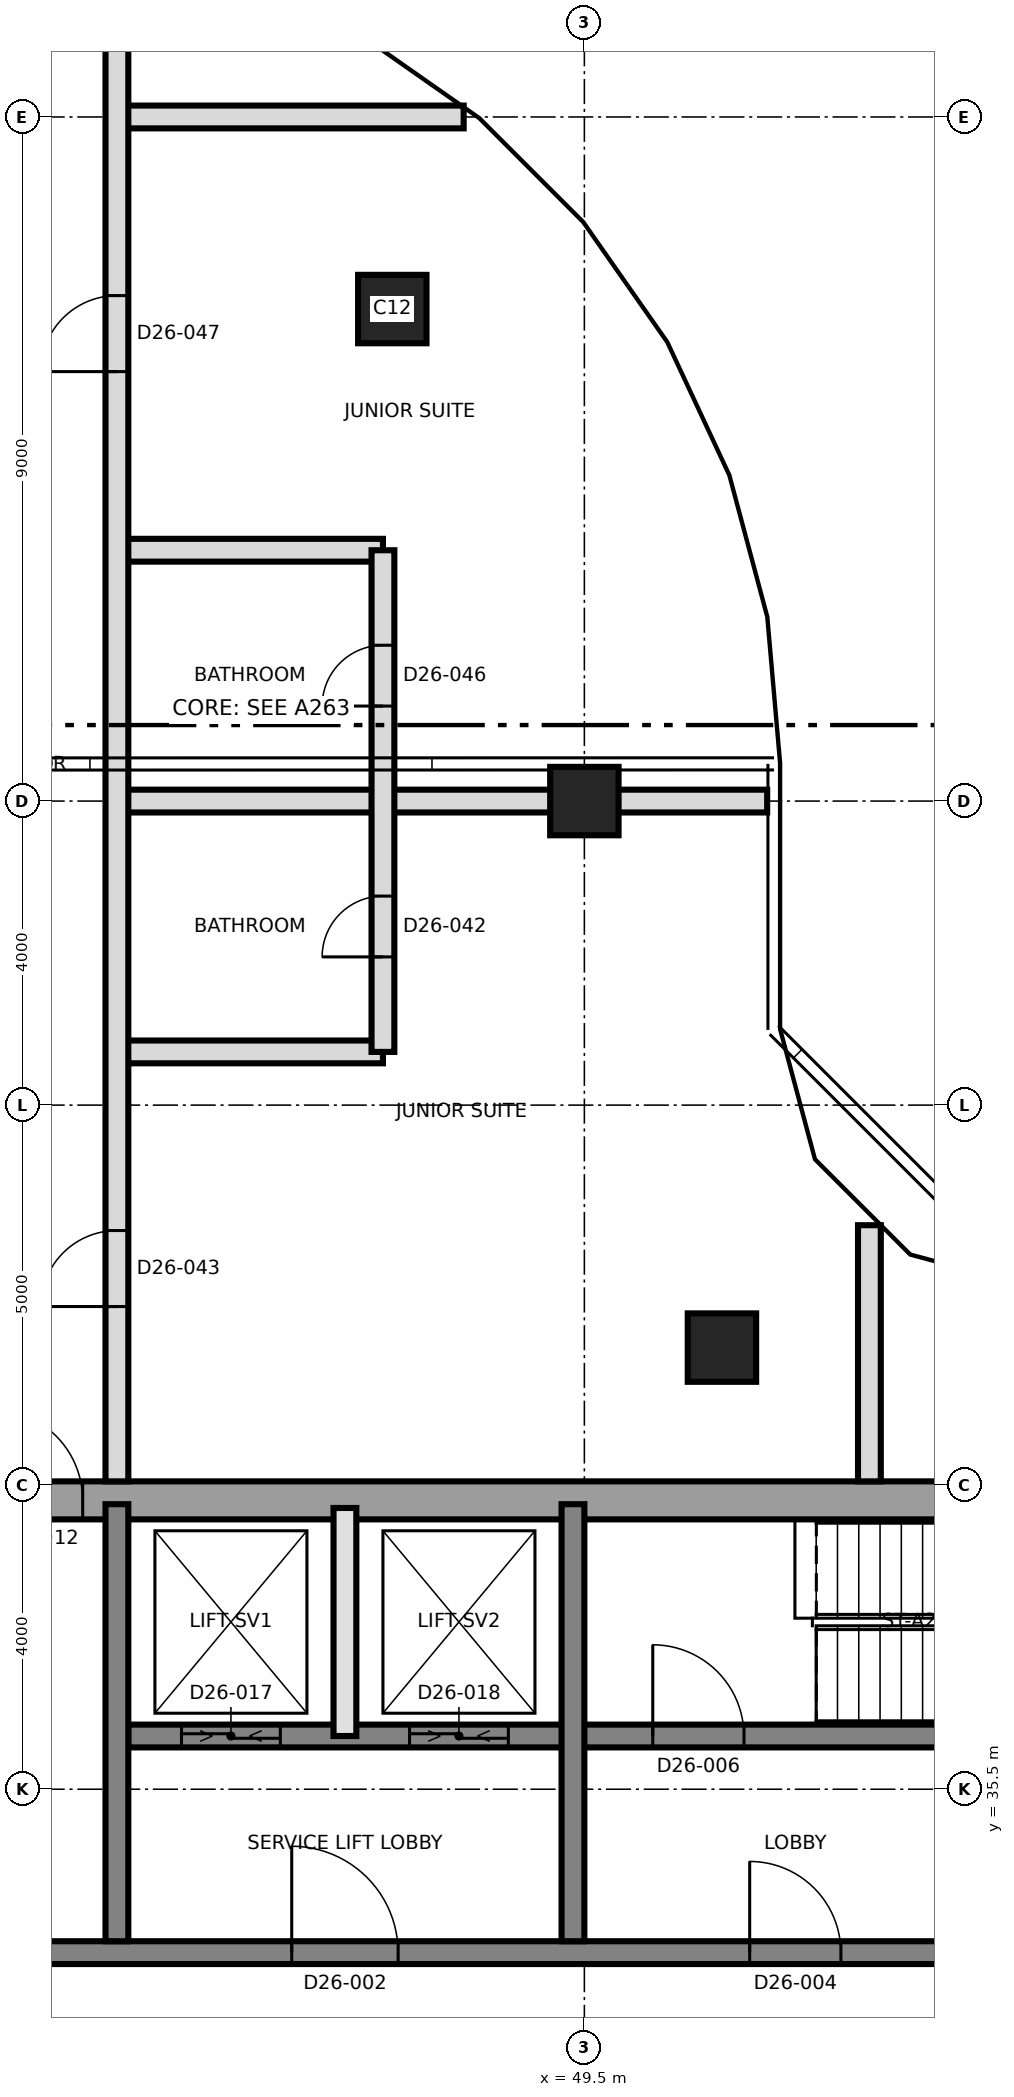
"""IFC4 building model, lengths in metres.
Left out: names, types, materials, properties, quantities, classifications, styles, units other than length and angle.
Written with IfcOpenShell. Run it as: python <this file> out.ifc"""

import sys

from ifc_helpers import new_model, si_unit, direction, frame, frame_2d, origin, origin_2d, place, context, subcontext, project, spatial, rectangle, extrude, element, fill, save


model = new_model("IFC4")
c1 = context("Model", 3, precision=1e-05, world=origin(), true_north=direction((0.0, 1.0)))
c2 = subcontext(c1, "Body", "Model", "MODEL_VIEW")
j1 = project(units=[si_unit("LENGTHUNIT", "METRE"), si_unit("PLANEANGLEUNIT", "RADIAN")], contexts=[c1])
p1 = place(None, origin())
s1 = spatial("IfcSite", under=j1, at=p1, CompositionType="ELEMENT")
p2 = place(p1, origin())
s2 = spatial("IfcBuilding", under=s1, at=p2, CompositionType="ELEMENT")
p3 = place(p2, frame((0.0, 0.0, 240.2)))
s3 = spatial("IfcBuildingStorey", under=s2, at=p3, CompositionType="ELEMENT", Elevation=240.2)
p4 = place(p3, frame((31.25, 39.3, 0.0), z_axis=(0.0, 0.0, 1.0), x_axis=(1.0, 0.0, 0.0)))
e1 = element("IfcWall", 1, at=p4, inside=s3, PredefinedType="SHEAR", context=c2, shape_type="SweptSolid", body=[
    extrude(rectangle(XDim=27.0, YDim=0.5, at=frame_2d((13.5, 0.0))), origin(), (0.0, 0.0, 1.0), 3.7),
])
p5 = place(p4, frame((10.45, 0.0, 0.0)))
e2 = element("IfcOpeningElement", 2, at=p5, cuts=e1, PredefinedType="OPENING", context=c2, shape_type="SweptSolid", body=[
    extrude(rectangle(XDim=1.2, YDim=2.1, at=frame_2d((0.6, 1.05))), frame((0.0, 0.26, 0.0), z_axis=(0.0, -1.0, 0.0), x_axis=(1.0, 0.0, 0.0)), (0.0, 0.0, 1.0), 0.52),
])
p6 = place(p3, frame((31.75, 33.35, 0.0), z_axis=(0.0, 0.0, 1.0), x_axis=(1.0, 0.0, 0.0)))
e3 = element("IfcWall", 3, at=p6, inside=s3, PredefinedType="SHEAR", context=c2, shape_type="SweptSolid", body=[
    extrude(rectangle(XDim=26.5, YDim=0.3, at=frame_2d((13.25, 0.0))), origin(), (0.0, 0.0, 1.0), 3.7),
])
p7 = place(p6, frame((13.9, 0.0, 0.0)))
e4 = element("IfcOpeningElement", 4, at=p7, cuts=e3, PredefinedType="OPENING", context=c2, shape_type="SweptSolid", body=[
    extrude(rectangle(XDim=1.4, YDim=2.1, at=frame_2d((0.7, 1.05))), frame((0.0, 0.16, 0.0), z_axis=(0.0, -1.0, 0.0), x_axis=(1.0, 0.0, 0.0)), (0.0, 0.0, 1.0), 0.32),
])
p8 = place(p6, frame((5.375, 0.0, 0.0)))
e5 = element("IfcOpeningElement", 5, at=p8, cuts=e3, PredefinedType="OPENING", context=c2, shape_type="SweptSolid", body=[
    extrude(rectangle(XDim=1.2, YDim=2.1, at=frame_2d((0.6, 1.05))), frame((0.0, 0.16, 0.0), z_axis=(0.0, -1.0, 0.0), x_axis=(1.0, 0.0, 0.0)), (0.0, 0.0, 1.0), 0.32),
])
p9 = place(p6, frame((19.925, 0.0, 0.0)))
e6 = element("IfcOpeningElement", 6, at=p9, cuts=e3, PredefinedType="OPENING", context=c2, shape_type="SweptSolid", body=[
    extrude(rectangle(XDim=1.2, YDim=2.1, at=frame_2d((0.6, 1.05))), frame((0.0, 0.16, 0.0), z_axis=(0.0, -1.0, 0.0), x_axis=(1.0, 0.0, 0.0)), (0.0, 0.0, 1.0), 0.32),
])
p10 = place(p3, frame((43.5, 36.2, 0.0), z_axis=(0.0, 0.0, 1.0), x_axis=(1.0, 0.0, 0.0)))
e7 = element("IfcWall", 7, at=p10, inside=s3, PredefinedType="SHEAR", context=c2, shape_type="SweptSolid", body=[
    extrude(rectangle(XDim=14.75, YDim=0.3, at=frame_2d((7.375, 0.0))), origin(), (0.0, 0.0, 1.0), 3.7),
])
p11 = place(p10, frame((6.9, 0.0, 0.0)))
e8 = element("IfcOpeningElement", 8, at=p11, cuts=e7, PredefinedType="OPENING", context=c2, shape_type="SweptSolid", body=[
    extrude(rectangle(XDim=1.2, YDim=2.1, at=frame_2d((0.6, 1.05))), frame((0.0, 0.16, 0.0), z_axis=(0.0, -1.0, 0.0), x_axis=(1.0, 0.0, 0.0)), (0.0, 0.0, 1.0), 0.32),
])
p12 = place(p10, frame((0.7, 0.0, 0.0)))
e9 = element("IfcOpeningElement", 9, at=p12, cuts=e7, PredefinedType="OPENING", context=c2, shape_type="SweptSolid", body=[
    extrude(rectangle(XDim=1.3, YDim=2.4, at=frame_2d((0.65, 1.2))), frame((0.0, 0.16, 0.0), z_axis=(0.0, -1.0, 0.0), x_axis=(1.0, 0.0, 0.0)), (0.0, 0.0, 1.0), 0.32),
])
p13 = place(p10, frame((3.7, 0.0, 0.0)))
e10 = element("IfcOpeningElement", 10, at=p13, cuts=e7, PredefinedType="OPENING", context=c2, shape_type="SweptSolid", body=[
    extrude(rectangle(XDim=1.3, YDim=2.4, at=frame_2d((0.65, 1.2))), frame((0.0, 0.16, 0.0), z_axis=(0.0, -1.0, 0.0), x_axis=(1.0, 0.0, 0.0)), (0.0, 0.0, 1.0), 0.32),
])
for number, where, z_axis, x_axis in (
    (11, (43.35, 33.5, 0.0), (0.0, 0.0, 1.0), (0.0, 1.0, 0.0)),
    (12, (49.35, 33.5, 0.0), (0.0, 0.0, 1.0), (0.0, 1.0, 0.0)),
):
    element("IfcWall", number, at=place(p3, frame(where, z_axis=z_axis, x_axis=x_axis)), inside=s3, PredefinedType="SHEAR", context=c2, shape_type="SweptSolid", body=[
        extrude(rectangle(XDim=5.75, YDim=0.3, at=frame_2d((2.875, 0.0))), origin(), (0.0, 0.0, 1.0), 3.7),
    ])
for number, where, z_axis, x_axis in (
    (13, (51.31, 41.31, 0.0), (0.0, 0.0, 1.0), (1.0, 0.0, 0.0)),
    (14, (49.5, 48.5, 0.0), (0.0, 0.0, 1.0), (1.0, 0.0, 0.0)),
    (15, (46.973, 54.973, 0.0), (0.0, 0.0, 1.0), (1.0, 0.0, 0.0)),
):
    element("IfcColumn", number, at=place(p3, frame(where, z_axis=z_axis, x_axis=x_axis)), inside=s3, PredefinedType="COLUMN", context=c2, shape_type="SweptSolid", body=[
        extrude(rectangle(XDim=0.9, YDim=0.9, at=origin_2d()), origin(), (0.0, 0.0, 1.0), 3.7),
    ])
p14 = place(p3, frame((46.35, 36.2, 0.0), z_axis=(0.0, 0.0, 1.0), x_axis=(0.0, 1.0, 0.0)))
e16 = element("IfcWall", 16, at=p14, inside=s3, PredefinedType="SOLIDWALL", context=c2, shape_type="SweptSolid", body=[
    extrude(rectangle(XDim=3.0, YDim=0.3, at=frame_2d((1.5, 0.0))), origin(), (0.0, 0.0, 1.0), 3.4),
])
p15 = place(p3, frame((43.35, 45.2, 0.0), z_axis=(0.0, 0.0, 1.0), x_axis=(1.0, 0.0, 0.0)))
e17 = element("IfcWall", 17, at=p15, inside=s3, PredefinedType="PARTITIONING", context=c2, shape_type="SweptSolid", body=[
    extrude(rectangle(XDim=3.5, YDim=0.3, at=frame_2d((1.75, 0.0))), origin(), (0.0, 0.0, 1.0), 3.4),
])
p16 = place(p3, frame((43.35, 48.5, 0.0), z_axis=(0.0, 0.0, 1.0), x_axis=(1.0, 0.0, 0.0)))
e18 = element("IfcWall", 18, at=p16, inside=s3, PredefinedType="PARTITIONING", context=c2, shape_type="SweptSolid", body=[
    extrude(rectangle(XDim=8.555, YDim=0.3, at=frame_2d((4.277, 0.0))), origin(), (0.0, 0.0, 1.0), 3.35),
])
p17 = place(p3, frame((43.35, 51.8, 0.0), z_axis=(0.0, 0.0, 1.0), x_axis=(1.0, 0.0, 0.0)))
e19 = element("IfcWall", 19, at=p17, inside=s3, PredefinedType="PARTITIONING", context=c2, shape_type="SweptSolid", body=[
    extrude(rectangle(XDim=3.5, YDim=0.3, at=frame_2d((1.75, 0.0))), origin(), (0.0, 0.0, 1.0), 3.4),
])
p18 = place(p3, frame((43.35, 57.5, 0.0), z_axis=(0.0, 0.0, 1.0), x_axis=(1.0, 0.0, 0.0)))
e20 = element("IfcWall", 20, at=p18, inside=s3, PredefinedType="PARTITIONING", context=c2, shape_type="SweptSolid", body=[
    extrude(rectangle(XDim=4.562, YDim=0.3, at=frame_2d((2.281, 0.0))), origin(), (0.0, 0.0, 1.0), 3.35),
])
p19 = place(p3, frame((43.35, 39.55, 0.0), z_axis=(0.0, 0.0, 1.0), x_axis=(0.0, 1.0, 0.0)))
e21 = element("IfcWall", 21, at=p19, inside=s3, PredefinedType="PARTITIONING", context=c2, shape_type="SweptSolid", body=[
    extrude(rectangle(XDim=19.0, YDim=0.3, at=frame_2d((9.5, 0.0))), origin(), (0.0, 0.0, 1.0), 3.35),
])
p20 = place(p19, frame((2.3, 0.0, 0.0)))
e22 = element("IfcOpeningElement", 22, at=p20, cuts=e21, PredefinedType="OPENING", context=c2, shape_type="SweptSolid", body=[
    extrude(rectangle(XDim=1.0, YDim=2.4, at=frame_2d((0.5, 1.2))), frame((0.0, 0.16, 0.0), z_axis=(0.0, -1.0, 0.0), x_axis=(1.0, 0.0, 0.0)), (0.0, 0.0, 1.0), 0.32),
])
p21 = place(p19, frame((14.6, 0.0, 0.0)))
e23 = element("IfcOpeningElement", 23, at=p21, cuts=e21, PredefinedType="OPENING", context=c2, shape_type="SweptSolid", body=[
    extrude(rectangle(XDim=1.0, YDim=2.4, at=frame_2d((0.5, 1.2))), frame((0.0, 0.16, 0.0), z_axis=(0.0, -1.0, 0.0), x_axis=(1.0, 0.0, 0.0)), (0.0, 0.0, 1.0), 0.32),
])
p22 = place(p3, frame((46.85, 45.2, 0.0), z_axis=(0.0, 0.0, 1.0), x_axis=(0.0, 1.0, 0.0)))
e24 = element("IfcWall", 24, at=p22, inside=s3, PredefinedType="PARTITIONING", context=c2, shape_type="SweptSolid", body=[
    extrude(rectangle(XDim=6.6, YDim=0.3, at=frame_2d((3.3, 0.0))), origin(), (0.0, 0.0, 1.0), 3.4),
])
p23 = place(p22, frame((1.25, 0.0, 0.0)))
e25 = element("IfcOpeningElement", 25, at=p23, cuts=e24, PredefinedType="OPENING", context=c2, shape_type="SweptSolid", body=[
    extrude(rectangle(XDim=0.8, YDim=2.1, at=frame_2d((0.4, 1.05))), frame((0.0, 0.16, 0.0), z_axis=(0.0, -1.0, 0.0), x_axis=(1.0, 0.0, 0.0)), (0.0, 0.0, 1.0), 0.32),
])
p24 = place(p22, frame((4.55, 0.0, 0.0)))
e26 = element("IfcOpeningElement", 26, at=p24, cuts=e24, PredefinedType="OPENING", context=c2, shape_type="SweptSolid", body=[
    extrude(rectangle(XDim=0.8, YDim=2.1, at=frame_2d((0.4, 1.05))), frame((0.0, 0.16, 0.0), z_axis=(0.0, -1.0, 0.0), x_axis=(1.0, 0.0, 0.0)), (0.0, 0.0, 1.0), 0.32),
])
p25 = place(p3, frame((53.25, 39.55, 0.0), z_axis=(0.0, 0.0, 1.0), x_axis=(0.0, 1.0, 0.0)))
e27 = element("IfcWall", 27, at=p25, inside=s3, PredefinedType="PARTITIONING", context=c2, shape_type="SweptSolid", body=[
    extrude(rectangle(XDim=3.37, YDim=0.3, at=frame_2d((1.685, 0.0))), origin(), (0.0, 0.0, 1.0), 3.35),
])
p26 = place(p7, origin())
e28 = element("IfcDoor", 28, at=p26, inside=s3, OperationType="SINGLE_SWING_RIGHT", PredefinedType="DOOR", context=c2, shape_type="SweptSolid", body=[
    extrude(rectangle(XDim=1.4, YDim=2.1, at=frame_2d((0.7, 1.05))), frame((0.0, 0.025, 0.0), z_axis=(0.0, -1.0, 0.0), x_axis=(1.0, 0.0, 0.0)), (0.0, 0.0, 1.0), 0.05),
])
fill(e4, e28)
p27 = place(p9, origin())
e29 = element("IfcDoor", 29, at=p27, inside=s3, OperationType="SINGLE_SWING_RIGHT", PredefinedType="DOOR", context=c2, shape_type="SweptSolid", body=[
    extrude(rectangle(XDim=1.2, YDim=2.1, at=frame_2d((0.6, 1.05))), frame((0.0, 0.025, 0.0), z_axis=(0.0, -1.0, 0.0), x_axis=(1.0, 0.0, 0.0)), (0.0, 0.0, 1.0), 0.05),
])
fill(e6, e29)
p28 = place(p11, origin())
e30 = element("IfcDoor", 30, at=p28, inside=s3, OperationType="SINGLE_SWING_LEFT", PredefinedType="DOOR", context=c2, shape_type="SweptSolid", body=[
    extrude(rectangle(XDim=1.2, YDim=2.1, at=frame_2d((0.6, 1.05))), frame((0.0, 0.025, 0.0), z_axis=(0.0, -1.0, 0.0), x_axis=(1.0, 0.0, 0.0)), (0.0, 0.0, 1.0), 0.05),
])
fill(e8, e30)
p29 = place(p5, origin())
e31 = element("IfcDoor", 31, at=p29, inside=s3, OperationType="SINGLE_SWING_RIGHT", PredefinedType="DOOR", context=c2, shape_type="SweptSolid", body=[
    extrude(rectangle(XDim=1.2, YDim=2.1, at=frame_2d((0.6, 1.05))), frame((0.0, 0.025, 0.0), z_axis=(0.0, -1.0, 0.0), x_axis=(1.0, 0.0, 0.0)), (0.0, 0.0, 1.0), 0.05),
])
fill(e2, e31)
p30 = place(p12, origin())
e32 = element("IfcDoor", 32, at=p30, inside=s3, OperationType="SLIDING_TO_LEFT", PredefinedType="DOOR", context=c2, shape_type="SweptSolid", body=[
    extrude(rectangle(XDim=1.3, YDim=2.4, at=frame_2d((0.65, 1.2))), frame((0.0, 0.025, 0.0), z_axis=(0.0, -1.0, 0.0), x_axis=(1.0, 0.0, 0.0)), (0.0, 0.0, 1.0), 0.05),
])
fill(e9, e32)
p31 = place(p13, origin())
e33 = element("IfcDoor", 33, at=p31, inside=s3, OperationType="SLIDING_TO_LEFT", PredefinedType="DOOR", context=c2, shape_type="SweptSolid", body=[
    extrude(rectangle(XDim=1.3, YDim=2.4, at=frame_2d((0.65, 1.2))), frame((0.0, 0.025, 0.0), z_axis=(0.0, -1.0, 0.0), x_axis=(1.0, 0.0, 0.0)), (0.0, 0.0, 1.0), 0.05),
])
fill(e10, e33)
p32 = place(p23, origin())
e34 = element("IfcDoor", 34, at=p32, inside=s3, OperationType="SINGLE_SWING_RIGHT", PredefinedType="DOOR", context=c2, shape_type="SweptSolid", body=[
    extrude(rectangle(XDim=0.8, YDim=2.1, at=frame_2d((0.4, 1.05))), frame((0.0, 0.025, 0.0), z_axis=(0.0, -1.0, 0.0), x_axis=(1.0, 0.0, 0.0)), (0.0, 0.0, 1.0), 0.05),
])
fill(e25, e34)
p33 = place(p20, origin())
e35 = element("IfcDoor", 35, at=p33, inside=s3, OperationType="SINGLE_SWING_LEFT", PredefinedType="DOOR", context=c2, shape_type="SweptSolid", body=[
    extrude(rectangle(XDim=1.0, YDim=2.4, at=frame_2d((0.5, 1.2))), frame((0.0, 0.025, 0.0), z_axis=(0.0, -1.0, 0.0), x_axis=(1.0, 0.0, 0.0)), (0.0, 0.0, 1.0), 0.05),
])
fill(e22, e35)
p34 = place(p24, origin())
e36 = element("IfcDoor", 36, at=p34, inside=s3, OperationType="SINGLE_SWING_LEFT", PredefinedType="DOOR", context=c2, shape_type="SweptSolid", body=[
    extrude(rectangle(XDim=0.8, YDim=2.1, at=frame_2d((0.4, 1.05))), frame((0.0, 0.025, 0.0), z_axis=(0.0, -1.0, 0.0), x_axis=(1.0, 0.0, 0.0)), (0.0, 0.0, 1.0), 0.05),
])
fill(e26, e36)
p35 = place(p21, origin())
e37 = element("IfcDoor", 37, at=p35, inside=s3, OperationType="SINGLE_SWING_RIGHT", PredefinedType="DOOR", context=c2, shape_type="SweptSolid", body=[
    extrude(rectangle(XDim=1.0, YDim=2.4, at=frame_2d((0.5, 1.2))), frame((0.0, 0.025, 0.0), z_axis=(0.0, -1.0, 0.0), x_axis=(1.0, 0.0, 0.0)), (0.0, 0.0, 1.0), 0.05),
])
fill(e23, e37)
save(model, sys.argv[1])
